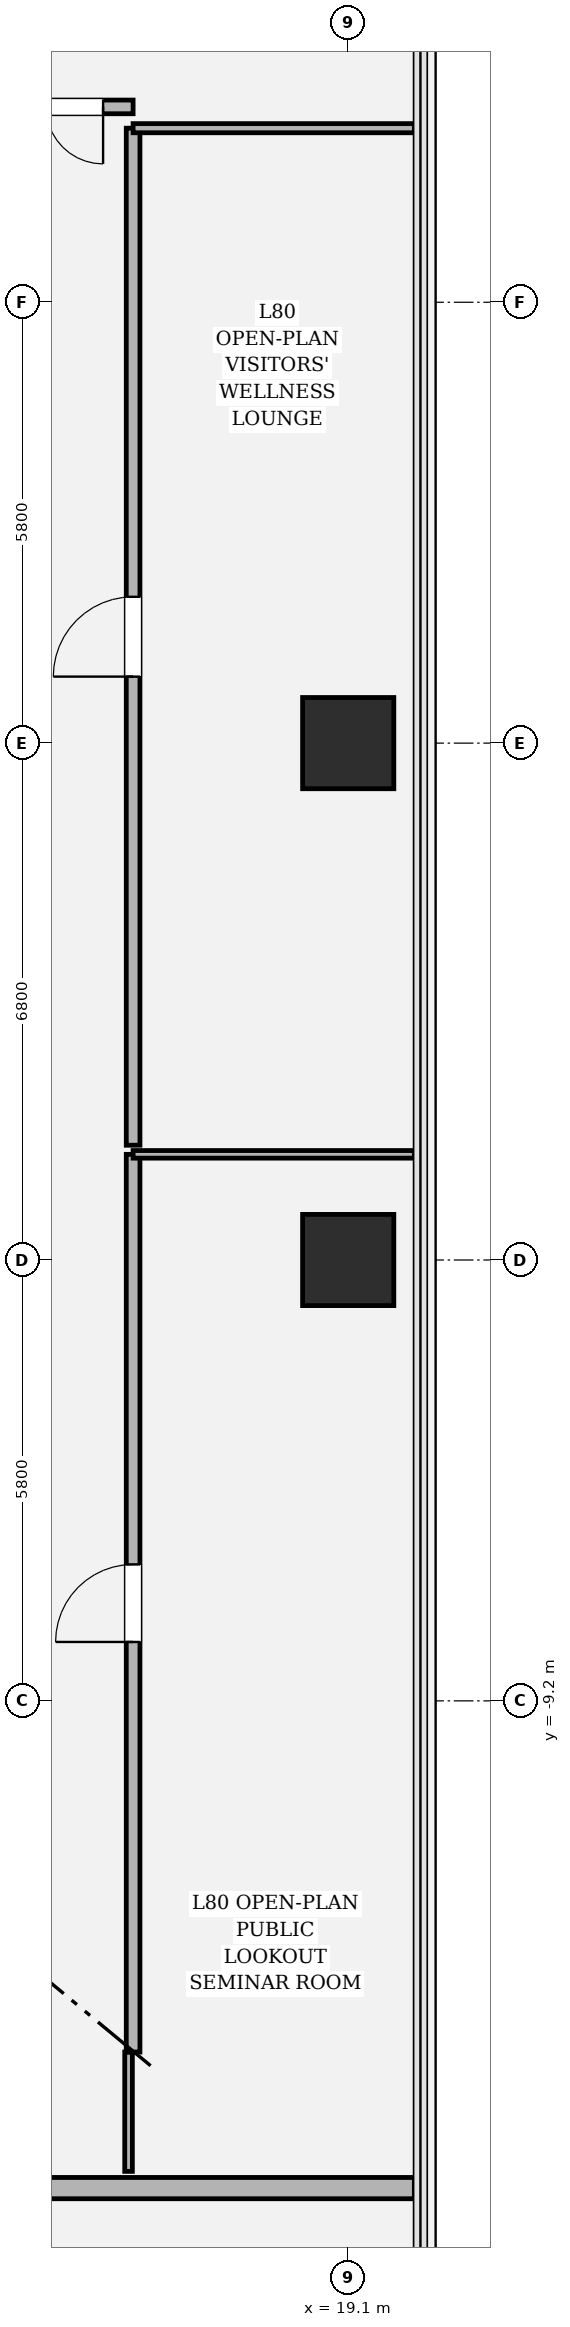
"""IFC4 building model, lengths in metres.
Left out: names, types, materials, properties, quantities, classifications, styles, units other than length and angle.
Written with IfcOpenShell. Run it as: python <this file> out.ifc"""

import sys

from ifc_helpers import new_model, si_unit, direction, frame, frame_2d, origin, origin_2d, place, context, subcontext, project, spatial, rectangle, hollow_rectangle, extrude, element, fill, save


model = new_model("IFC4")
c1 = context("Model", 3, precision=1e-05, world=origin(), true_north=direction((0.0, 1.0)))
c2 = subcontext(c1, "Body", "Model", "MODEL_VIEW")
j1 = project(units=[si_unit("LENGTHUNIT", "METRE"), si_unit("PLANEANGLEUNIT", "RADIAN")], contexts=[c1])
p1 = place(None, origin())
s1 = spatial("IfcSite", under=j1, at=p1, CompositionType="ELEMENT")
p2 = place(p1, origin())
s2 = spatial("IfcBuilding", under=s1, at=p2, CompositionType="ELEMENT")
p3 = place(p2, frame((0.0, 0.0, 339.0)))
s3 = spatial("IfcBuildingStorey", under=s2, at=p3, CompositionType="ELEMENT", Elevation=339.0)
for number, where, z_axis, x_axis in (
    (1, (19.1, -3.4, 0.0), (0.0, 0.0, 1.0), (1.0, 0.0, 0.0)),
    (2, (19.1, 3.4, 0.0), (0.0, 0.0, 1.0), (1.0, 0.0, 0.0)),
):
    element("IfcColumn", number, at=place(p3, frame(where, z_axis=z_axis, x_axis=x_axis)), inside=s3, PredefinedType="COLUMN", context=c2, shape_type="SweptSolid", body=[
        extrude(hollow_rectangle(XDim=1.2, YDim=1.2, WallThickness=0.035, at=origin_2d()), origin(), (0.0, 0.0, 1.0), 4.8),
    ])
p4 = place(p3, frame((14.42, -15.61, 0.0), z_axis=(0.0, 0.0, 1.0), x_axis=(1.0, 0.0, 0.0)))
e3 = element("IfcWall", 3, at=p4, inside=s3, PredefinedType="SOLIDWALL", context=c2, shape_type="SweptSolid", body=[
    extrude(rectangle(XDim=5.55, YDim=0.28, at=frame_2d((2.775, 0.0))), origin(), (0.0, 0.0, 1.0), 3.194),
])
p5 = place(p3, frame((16.21, -15.39, 0.0), z_axis=(0.0, 0.0, 1.0), x_axis=(0.0, 1.0, 0.0)))
e4 = element("IfcWall", 4, at=p5, inside=s3, PredefinedType="PARTITIONING", context=c2, shape_type="SweptSolid", body=[
    extrude(rectangle(XDim=1.57, YDim=0.1, at=frame_2d((0.785, 0.0))), origin(), (0.0, 0.0, 1.0), 4.52),
])
p6 = place(p3, frame((16.27, -13.82, 0.0), z_axis=(0.0, 0.0, 1.0), x_axis=(0.0, 1.0, 0.0)))
e5 = element("IfcWall", 5, at=p6, inside=s3, PredefinedType="PARTITIONING", context=c2, shape_type="SweptSolid", body=[
    extrude(rectangle(XDim=11.81, YDim=0.18, at=frame_2d((5.905, 0.0))), origin(), (0.0, 0.0, 1.0), 3.194),
])
p7 = place(p6, frame((5.395, 0.0, 0.0)))
e6 = element("IfcOpeningElement", 6, at=p7, cuts=e5, PredefinedType="OPENING", context=c2, shape_type="SweptSolid", body=[
    extrude(rectangle(XDim=1.02, YDim=2.2, at=frame_2d((0.51, 1.1))), frame((0.0, 0.1, 0.0), z_axis=(0.0, -1.0, 0.0), x_axis=(1.0, 0.0, 0.0)), (0.0, 0.0, 1.0), 0.2),
])
p8 = place(p3, frame((16.27, -2.01, 0.0), z_axis=(0.0, 0.0, 1.0), x_axis=(1.0, 0.0, 0.0)))
e7 = element("IfcWall", 7, at=p8, inside=s3, PredefinedType="PARTITIONING", context=c2, shape_type="SweptSolid", body=[
    extrude(rectangle(XDim=3.7, YDim=0.1, at=frame_2d((1.85, 0.0))), origin(), (0.0, 0.0, 1.0), 3.194),
])
p9 = place(p3, frame((16.27, -1.89, 0.0), z_axis=(0.0, 0.0, 1.0), x_axis=(0.0, 1.0, 0.0)))
e8 = element("IfcWall", 8, at=p9, inside=s3, PredefinedType="PARTITIONING", context=c2, shape_type="SweptSolid", body=[
    extrude(rectangle(XDim=13.38, YDim=0.18, at=frame_2d((6.69, 0.0))), origin(), (0.0, 0.0, 1.0), 3.194),
])
p10 = place(p9, frame((6.165, 0.0, 0.0)))
e9 = element("IfcOpeningElement", 9, at=p10, cuts=e8, PredefinedType="OPENING", context=c2, shape_type="SweptSolid", body=[
    extrude(rectangle(XDim=1.05, YDim=2.2, at=frame_2d((0.525, 1.1))), frame((0.0, 0.1, 0.0), z_axis=(0.0, -1.0, 0.0), x_axis=(1.0, 0.0, 0.0)), (0.0, 0.0, 1.0), 0.2),
])
p11 = place(p3, frame((16.27, 11.49, 0.0), z_axis=(0.0, 0.0, 1.0), x_axis=(1.0, 0.0, 0.0)))
e10 = element("IfcWall", 10, at=p11, inside=s3, PredefinedType="PARTITIONING", context=c2, shape_type="SweptSolid", body=[
    extrude(rectangle(XDim=3.7, YDim=0.12, at=frame_2d((1.85, 0.0))), origin(), (0.0, 0.0, 1.0), 3.194),
])
p12 = place(p3, frame((16.27, 11.77, 0.0), z_axis=(0.0, 0.0, 1.0), x_axis=(-1.0, 0.0, 0.0)))
e11 = element("IfcWall", 11, at=p12, inside=s3, PredefinedType="PARTITIONING", context=c2, shape_type="SweptSolid", body=[
    extrude(rectangle(XDim=2.29, YDim=0.18, at=frame_2d((1.145, 0.0))), origin(), (0.0, 0.0, 1.0), 4.52),
])
p13 = place(p12, frame((0.395, 0.0, 0.0)))
e12 = element("IfcOpeningElement", 12, at=p13, cuts=e11, PredefinedType="OPENING", context=c2, shape_type="SweptSolid", body=[
    extrude(rectangle(XDim=1.5, YDim=2.3, at=frame_2d((0.75, 1.15))), frame((0.0, 0.1, 0.0), z_axis=(0.0, -1.0, 0.0), x_axis=(1.0, 0.0, 0.0)), (0.0, 0.0, 1.0), 0.2),
])
p14 = place(p7, origin())
e13 = element("IfcDoor", 13, at=p14, inside=s3, OperationType="SINGLE_SWING_LEFT", PredefinedType="DOOR", context=c2, shape_type="SweptSolid", body=[
    extrude(rectangle(XDim=1.02, YDim=2.2, at=frame_2d((0.51, 1.1))), frame((0.0, 0.025, 0.0), z_axis=(0.0, -1.0, 0.0), x_axis=(1.0, 0.0, 0.0)), (0.0, 0.0, 1.0), 0.05),
])
fill(e6, e13)
p15 = place(p10, origin())
e14 = element("IfcDoor", 14, at=p15, inside=s3, OperationType="SINGLE_SWING_LEFT", PredefinedType="DOOR", context=c2, shape_type="SweptSolid", body=[
    extrude(rectangle(XDim=1.05, YDim=2.2, at=frame_2d((0.525, 1.1))), frame((0.0, 0.025, 0.0), z_axis=(0.0, -1.0, 0.0), x_axis=(1.0, 0.0, 0.0)), (0.0, 0.0, 1.0), 0.05),
])
fill(e9, e14)
p16 = place(p13, origin())
e15 = element("IfcDoor", 15, at=p16, inside=s3, OperationType="DOUBLE_DOOR_SINGLE_SWING", PredefinedType="DOOR", context=c2, shape_type="SweptSolid", body=[
    extrude(rectangle(XDim=1.5, YDim=2.3, at=frame_2d((0.75, 1.15))), frame((0.0, 0.025, 0.0), z_axis=(0.0, -1.0, 0.0), x_axis=(1.0, 0.0, 0.0)), (0.0, 0.0, 1.0), 0.05),
])
fill(e12, e15)
save(model, sys.argv[1])
